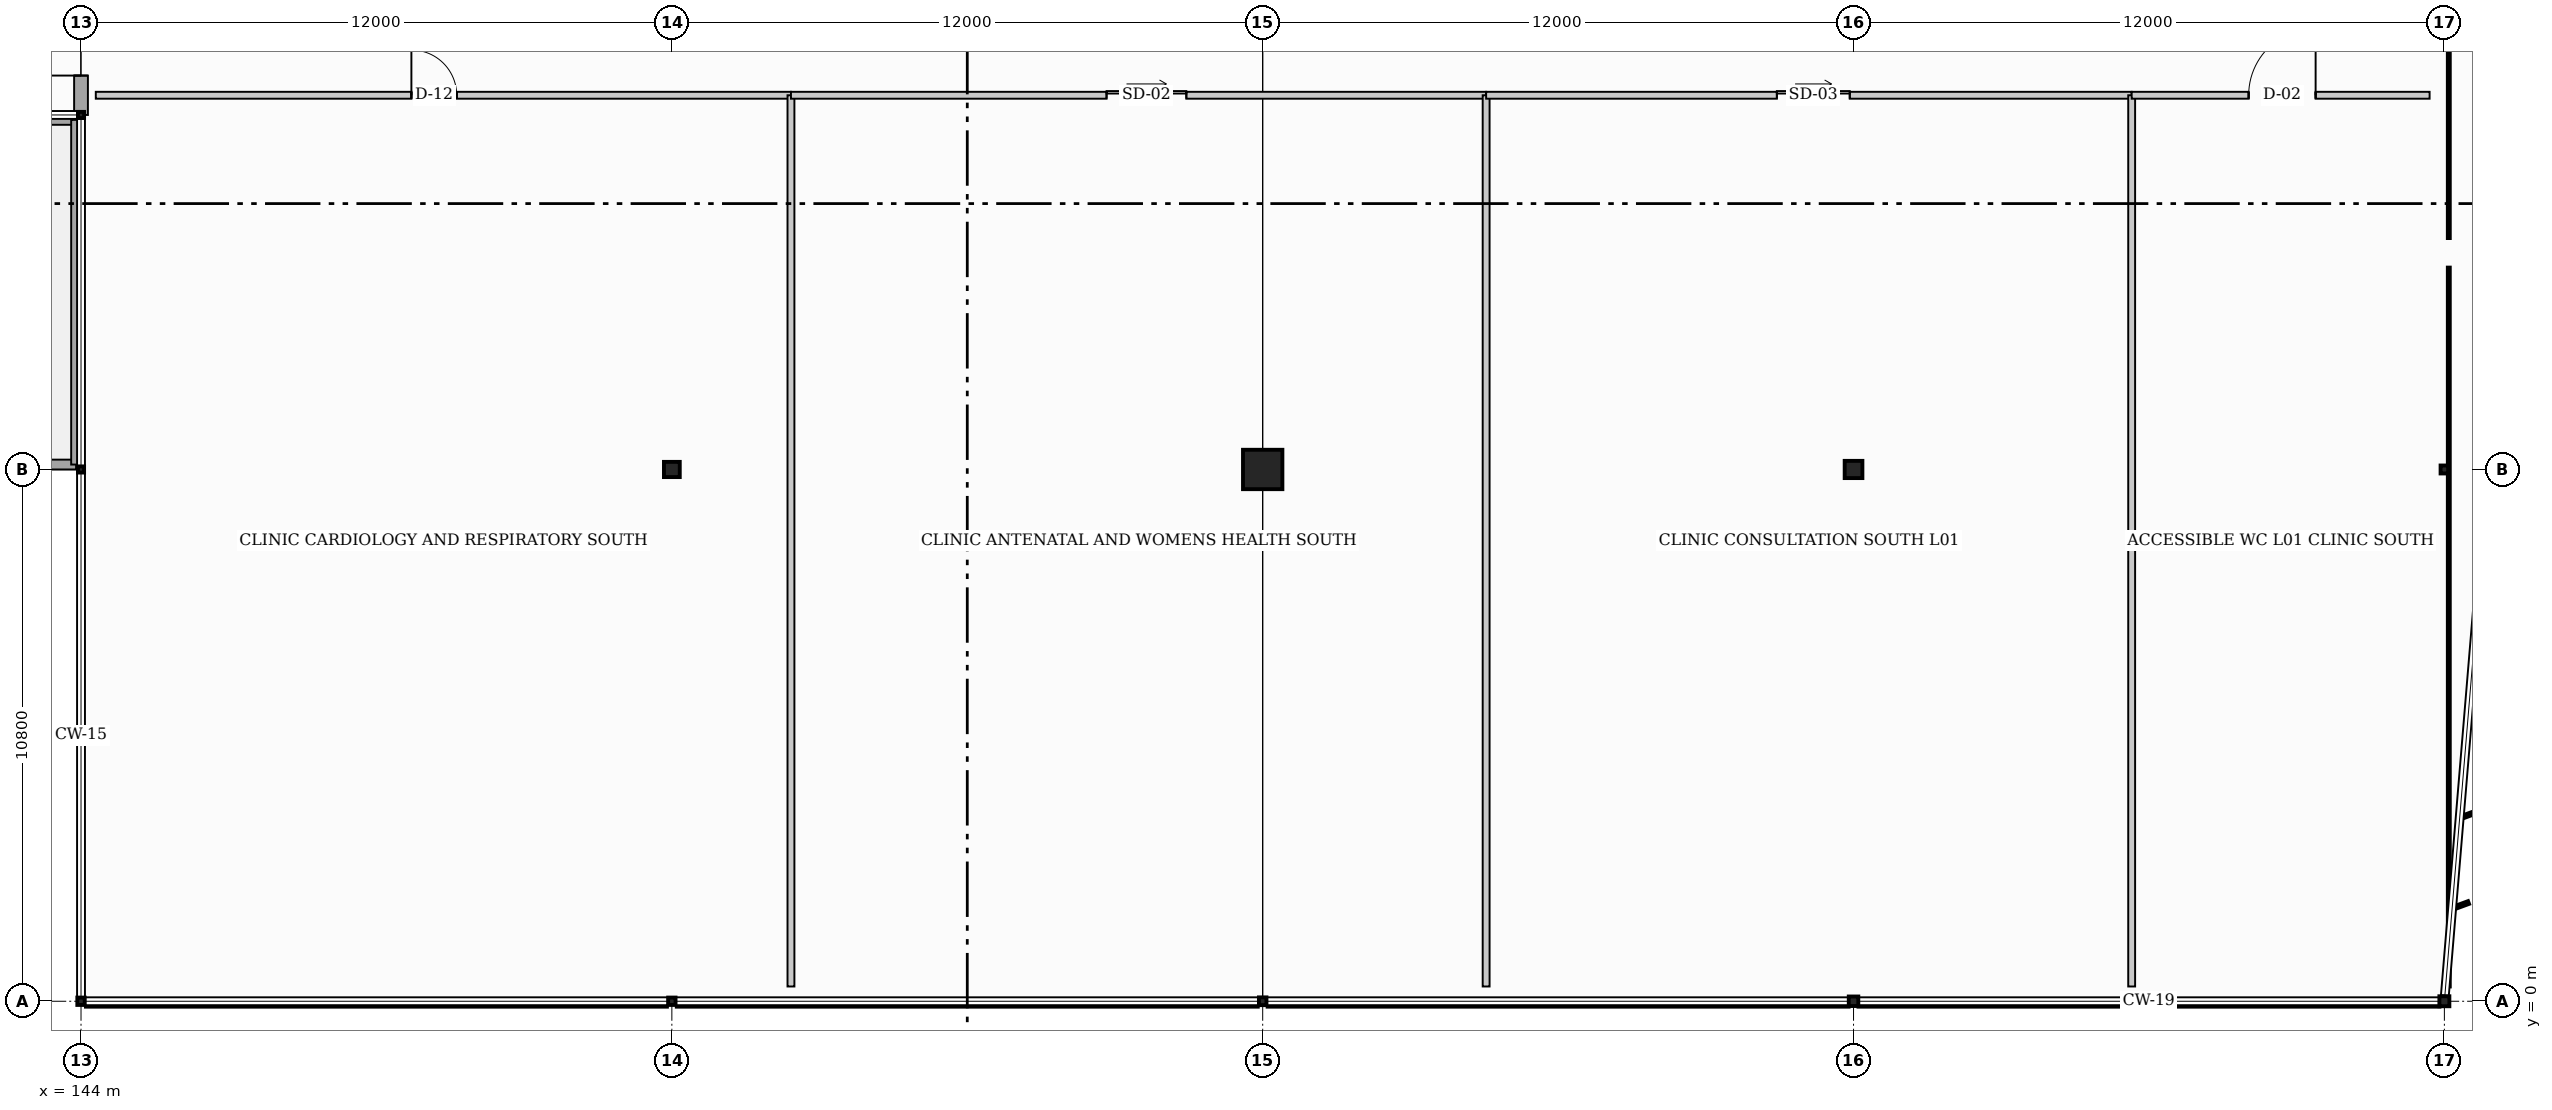
"""IFC4 building model, lengths in metres.
Left out: names, types, materials, properties, quantities, classifications, styles, units other than length and angle.
Written with IfcOpenShell. Run it as: python <this file> out.ifc"""

import sys

from ifc_helpers import new_model, si_unit, direction, frame, frame_2d, origin, origin_2d, place, context, subcontext, project, spatial, rectangle, hollow_rectangle, hollow_circle, i_section, extrude, element, fill, save


model = new_model("IFC4")
c1 = context("Model", 3, precision=1e-05, world=origin(), true_north=direction((0.0, 1.0)))
c2 = subcontext(c1, "Body", "Model", "MODEL_VIEW")
j1 = project(units=[si_unit("LENGTHUNIT", "METRE"), si_unit("PLANEANGLEUNIT", "RADIAN")], contexts=[c1])
p1 = place(None, origin())
s1 = spatial("IfcSite", under=j1, at=p1, CompositionType="ELEMENT")
p2 = place(p1, origin())
s2 = spatial("IfcBuilding", under=s1, at=p2, CompositionType="ELEMENT")
p3 = place(p2, frame((0.0, 0.0, 4.8)))
s3 = spatial("IfcBuildingStorey", under=s2, at=p3, CompositionType="ELEMENT", Elevation=4.8)
p4 = place(p3, frame((144.0, 0.0, 0.0), z_axis=(0.0, 0.0, 1.0), x_axis=(1.0, 0.0, 0.0)))
e1 = element("IfcColumn", 1, at=p4, inside=s3, PredefinedType="COLUMN", context=c2, shape_type="SweptSolid", body=[
    extrude(hollow_rectangle(XDim=0.15, YDim=0.15, WallThickness=0.008, at=origin_2d()), origin(), (0.0, 0.0, 1.0), 4.8),
])
p5 = place(p3, frame((144.0, 10.8, 0.0), z_axis=(0.0, 0.0, 1.0), x_axis=(1.0, 0.0, 0.0)))
e2 = element("IfcColumn", 2, at=p5, inside=s3, PredefinedType="COLUMN", context=c2, shape_type="SweptSolid", body=[
    extrude(hollow_rectangle(XDim=0.125, YDim=0.125, WallThickness=0.006, at=origin_2d()), origin(), (0.0, 0.0, 1.0), 4.8),
])
p6 = place(p3, frame((156.0, 0.0, 0.0), z_axis=(0.0, 0.0, 1.0), x_axis=(0.0, 1.0, 0.0)))
e3 = element("IfcColumn", 3, at=p6, inside=s3, PredefinedType="COLUMN", context=c2, shape_type="SweptSolid", body=[
    extrude(hollow_rectangle(XDim=0.15, YDim=0.15, WallThickness=0.008, at=origin_2d()), origin(), (0.0, 0.0, 1.0), 4.8),
])
p7 = place(p3, frame((156.0, 10.8, 0.0), z_axis=(0.0, 0.0, 1.0), x_axis=(0.0, 1.0, 0.0)))
e4 = element("IfcColumn", 4, at=p7, inside=s3, PredefinedType="COLUMN", context=c2, shape_type="SweptSolid", body=[
    extrude(i_section(OverallWidth=0.309, OverallDepth=0.321, WebThickness=0.014, FlangeThickness=0.022, at=origin_2d()), origin(), (0.0, 0.0, 1.0), 4.8),
])
p8 = place(p3, frame((168.0, 0.0, 0.0), z_axis=(0.0, 0.0, 1.0), x_axis=(1.0, 0.0, 0.0)))
e5 = element("IfcColumn", 5, at=p8, inside=s3, PredefinedType="COLUMN", context=c2, shape_type="SweptSolid", body=[
    extrude(i_section(OverallWidth=0.153, OverallDepth=0.158, WebThickness=0.007, FlangeThickness=0.01, at=origin_2d()), origin(), (0.0, 0.0, 1.0), 4.8),
])
p9 = place(p3, frame((168.0, 10.8, 0.0), z_axis=(0.0, 0.0, 1.0), x_axis=(1.0, 0.0, 0.0)))
e6 = element("IfcColumn", 6, at=p9, inside=s3, PredefinedType="COLUMN", context=c2, shape_type="SweptSolid", body=[
    extrude(rectangle(XDim=0.8, YDim=0.8, at=origin_2d()), origin(), (0.0, 0.0, 1.0), 4.8),
])
p10 = place(p3, frame((180.0, 0.0, 0.0), z_axis=(0.0, 0.0, 1.0), x_axis=(0.0, 1.0, 0.0)))
e7 = element("IfcColumn", 7, at=p10, inside=s3, PredefinedType="COLUMN", context=c2, shape_type="SweptSolid", body=[
    extrude(hollow_circle(Radius=0.097, WallThickness=0.008, at=origin_2d()), origin(), (0.0, 0.0, 1.0), 4.8),
])
p11 = place(p3, frame((180.0, 10.8, 0.0), z_axis=(0.0, 0.0, 1.0), x_axis=(0.0, 1.0, 0.0)))
e8 = element("IfcColumn", 8, at=p11, inside=s3, PredefinedType="COLUMN", context=c2, shape_type="SweptSolid", body=[
    extrude(i_section(OverallWidth=0.35, OverallDepth=0.36, WebThickness=0.016, FlangeThickness=0.028, at=origin_2d()), origin(), (0.0, 0.0, 1.0), 4.8),
])
p12 = place(p3, frame((192.0, 0.0, 0.0), z_axis=(0.0, 0.0, 1.0), x_axis=(1.0, 0.0, 0.0)))
e9 = element("IfcColumn", 9, at=p12, inside=s3, PredefinedType="COLUMN", context=c2, shape_type="SweptSolid", body=[
    extrude(i_section(OverallWidth=0.203, OverallDepth=0.203, WebThickness=0.007, FlangeThickness=0.011, at=origin_2d()), origin(), (0.0, 0.0, 1.0), 4.8),
])
p13 = place(p3, frame((192.0, 10.8, 0.0), z_axis=(0.0, 0.0, 1.0), x_axis=(1.0, 0.0, 0.0)))
e10 = element("IfcColumn", 10, at=p13, inside=s3, PredefinedType="COLUMN", context=c2, shape_type="SweptSolid", body=[
    extrude(i_section(OverallWidth=0.154, OverallDepth=0.162, WebThickness=0.008, FlangeThickness=0.011, at=origin_2d()), origin(), (0.0, 0.0, 1.0), 4.8),
])
p14 = place(p3, frame((144.0, 18.0, 0.0), z_axis=(0.0, 0.0, 1.0), x_axis=(1.0, 0.0, 0.0)))
e11 = element("IfcColumn", 11, at=p14, inside=s3, PredefinedType="COLUMN", context=c2, shape_type="SweptSolid", body=[
    extrude(hollow_rectangle(XDim=0.125, YDim=0.125, WallThickness=0.006, at=origin_2d()), origin(), (0.0, 0.0, 1.0), 4.8),
])
p15 = place(p3, frame((144.0, 18.0, 0.0), z_axis=(0.0, 0.0, 1.0), x_axis=(0.0, 1.0, 0.0)))
e12 = element("IfcWall", 12, at=p15, inside=s3, PredefinedType="STANDARD", context=c2, shape_type="SweptSolid", body=[
    extrude(rectangle(XDim=9.6, YDim=0.28, at=frame_2d((4.8, 0.0))), origin(), (0.0, 0.0, 1.0), 3.53),
])
p16 = place(p15, frame((0.8, 0.0, 0.0)))
e13 = element("IfcOpeningElement", 13, at=p16, cuts=e12, PredefinedType="OPENING", context=c2, shape_type="SweptSolid", body=[
    extrude(rectangle(XDim=2.1, YDim=2.25, at=frame_2d((1.05, 1.125))), frame((0.0, 0.15, 0.0), z_axis=(0.0, -1.0, 0.0), x_axis=(1.0, 0.0, 0.0)), (0.0, 0.0, 1.0), 0.3),
])
for number, where, z_axis, x_axis in (
    (14, (143.9, 10.9, 0.31), (0.0, 0.0, 1.0), (-1.0, 0.0, 0.0)),
    (15, (132.1, 17.9, 0.31), (0.0, 0.0, 1.0), (1.0, 0.0, 0.0)),
):
    element("IfcWall", number, at=place(p3, frame(where, z_axis=z_axis, x_axis=x_axis)), inside=s3, PredefinedType="PARAPET", context=c2, shape_type="SweptSolid", body=[
        extrude(rectangle(XDim=11.8, YDim=0.2, at=frame_2d((5.9, 0.0))), origin(), (0.0, 0.0, 1.0), 1.12),
    ])
p17 = place(p3, frame((143.9, 17.9, 0.31), z_axis=(0.0, 0.0, 1.0), x_axis=(0.0, -1.0, 0.0)))
e16 = element("IfcWall", 16, at=p17, inside=s3, PredefinedType="PARAPET", context=c2, shape_type="SweptSolid", body=[
    extrude(rectangle(XDim=7.0, YDim=0.2, at=frame_2d((3.5, 0.0))), origin(), (0.0, 0.0, 1.0), 1.12),
])
p18 = place(p3, frame((144.3, 18.4, 0.0), z_axis=(0.0, 0.0, 1.0), x_axis=(1.0, 0.0, 0.0)))
e17 = element("IfcWall", 17, at=p18, inside=s3, PredefinedType="PARTITIONING", context=c2, shape_type="SweptSolid", body=[
    extrude(rectangle(XDim=14.119, YDim=0.14, at=frame_2d((7.06, 0.0))), origin(), (0.0, 0.0, 1.0), 3.818),
])
p19 = place(p18, frame((6.41, 0.0, 0.0)))
e18 = element("IfcOpeningElement", 18, at=p19, cuts=e17, PredefinedType="OPENING", context=c2, shape_type="SweptSolid", body=[
    extrude(rectangle(XDim=0.92, YDim=2.04, at=frame_2d((0.46, 1.02))), frame((0.0, 0.08, 0.0), z_axis=(0.0, -1.0, 0.0), x_axis=(1.0, 0.0, 0.0)), (0.0, 0.0, 1.0), 0.16),
])
p20 = place(p3, frame((158.419, 0.3, 0.0), z_axis=(0.0, 0.0, 1.0), x_axis=(0.0, 1.0, 0.0)))
e19 = element("IfcWall", 19, at=p20, inside=s3, PredefinedType="PARTITIONING", context=c2, shape_type="SweptSolid", body=[
    extrude(rectangle(XDim=18.1, YDim=0.14, at=frame_2d((9.05, 0.0))), origin(), (0.0, 0.0, 1.0), 3.53),
])
p21 = place(p3, frame((158.419, 18.4, 0.0), z_axis=(0.0, 0.0, 1.0), x_axis=(1.0, 0.0, 0.0)))
e20 = element("IfcWall", 20, at=p21, inside=s3, PredefinedType="PARTITIONING", context=c2, shape_type="SweptSolid", body=[
    extrude(rectangle(XDim=14.119, YDim=0.14, at=frame_2d((7.06, 0.0))), origin(), (0.0, 0.0, 1.0), 3.828),
])
p22 = place(p21, frame((6.41, 0.0, 0.0)))
e21 = element("IfcOpeningElement", 21, at=p22, cuts=e20, PredefinedType="OPENING", context=c2, shape_type="SweptSolid", body=[
    extrude(rectangle(XDim=1.62, YDim=2.3, at=frame_2d((0.81, 1.15))), frame((0.0, 0.08, 0.0), z_axis=(0.0, -1.0, 0.0), x_axis=(1.0, 0.0, 0.0)), (0.0, 0.0, 1.0), 0.16),
])
p23 = place(p3, frame((172.538, 0.3, 0.0), z_axis=(0.0, 0.0, 1.0), x_axis=(0.0, 1.0, 0.0)))
e22 = element("IfcWall", 22, at=p23, inside=s3, PredefinedType="PARTITIONING", context=c2, shape_type="SweptSolid", body=[
    extrude(rectangle(XDim=18.1, YDim=0.14, at=frame_2d((9.05, 0.0))), origin(), (0.0, 0.0, 1.0), 3.738),
])
p24 = place(p3, frame((172.538, 18.4, 0.0), z_axis=(0.0, 0.0, 1.0), x_axis=(1.0, 0.0, 0.0)))
e23 = element("IfcWall", 23, at=p24, inside=s3, PredefinedType="PARTITIONING", context=c2, shape_type="SweptSolid", body=[
    extrude(rectangle(XDim=13.111, YDim=0.14, at=frame_2d((6.555, 0.0))), origin(), (0.0, 0.0, 1.0), 3.897),
])
p25 = place(p24, frame((5.905, 0.0, 0.0)))
e24 = element("IfcOpeningElement", 24, at=p25, cuts=e23, PredefinedType="OPENING", context=c2, shape_type="SweptSolid", body=[
    extrude(rectangle(XDim=1.48, YDim=2.26, at=frame_2d((0.74, 1.13))), frame((0.0, 0.08, 0.0), z_axis=(0.0, -1.0, 0.0), x_axis=(1.0, 0.0, 0.0)), (0.0, 0.0, 1.0), 0.16),
])
p26 = place(p3, frame((185.649, 0.3, 0.0), z_axis=(0.0, 0.0, 1.0), x_axis=(0.0, 1.0, 0.0)))
e25 = element("IfcWall", 25, at=p26, inside=s3, PredefinedType="PARTITIONING", context=c2, shape_type="SweptSolid", body=[
    extrude(rectangle(XDim=18.1, YDim=0.14, at=frame_2d((9.05, 0.0))), origin(), (0.0, 0.0, 1.0), 3.818),
])
p27 = place(p3, frame((185.649, 18.4, 0.0), z_axis=(0.0, 0.0, 1.0), x_axis=(1.0, 0.0, 0.0)))
e26 = element("IfcWall", 26, at=p27, inside=s3, PredefinedType="PARTITIONING", context=c2, shape_type="SweptSolid", body=[
    extrude(rectangle(XDim=6.051, YDim=0.14, at=frame_2d((3.025, 0.0))), origin(), (0.0, 0.0, 1.0), 4.027),
])
p28 = place(p27, frame((2.376, 0.0, 0.0)))
e27 = element("IfcOpeningElement", 27, at=p28, cuts=e26, PredefinedType="OPENING", context=c2, shape_type="SweptSolid", body=[
    extrude(rectangle(XDim=1.36, YDim=2.18, at=frame_2d((0.68, 1.09))), frame((0.0, 0.08, 0.0), z_axis=(0.0, -1.0, 0.0), x_axis=(1.0, 0.0, 0.0)), (0.0, 0.0, 1.0), 0.16),
])
p29 = place(p16, origin())
e28 = element("IfcDoor", 28, at=p29, inside=s3, OperationType="DOUBLE_DOOR_SINGLE_SWING", PredefinedType="DOOR", context=c2, shape_type="SweptSolid", body=[
    extrude(rectangle(XDim=2.1, YDim=2.25, at=frame_2d((1.05, 1.125))), frame((0.0, 0.025, 0.0), z_axis=(0.0, -1.0, 0.0), x_axis=(1.0, 0.0, 0.0)), (0.0, 0.0, 1.0), 0.05),
])
fill(e13, e28)
p30 = place(p19, origin())
e29 = element("IfcDoor", 29, at=p30, inside=s3, OperationType="SINGLE_SWING_LEFT", PredefinedType="DOOR", context=c2, shape_type="SweptSolid", body=[
    extrude(rectangle(XDim=0.92, YDim=2.04, at=frame_2d((0.46, 1.02))), frame((0.0, 0.025, 0.0), z_axis=(0.0, -1.0, 0.0), x_axis=(1.0, 0.0, 0.0)), (0.0, 0.0, 1.0), 0.05),
])
fill(e18, e29)
p31 = place(p22, origin())
e30 = element("IfcDoor", 30, at=p31, inside=s3, OperationType="SLIDING_TO_RIGHT", PredefinedType="DOOR", context=c2, shape_type="SweptSolid", body=[
    extrude(rectangle(XDim=1.62, YDim=2.3, at=frame_2d((0.81, 1.15))), frame((0.0, 0.025, 0.0), z_axis=(0.0, -1.0, 0.0), x_axis=(1.0, 0.0, 0.0)), (0.0, 0.0, 1.0), 0.05),
])
fill(e21, e30)
p32 = place(p25, origin())
e31 = element("IfcDoor", 31, at=p32, inside=s3, OperationType="SLIDING_TO_LEFT", PredefinedType="DOOR", context=c2, shape_type="SweptSolid", body=[
    extrude(rectangle(XDim=1.48, YDim=2.26, at=frame_2d((0.74, 1.13))), frame((0.0, 0.025, 0.0), z_axis=(0.0, -1.0, 0.0), x_axis=(1.0, 0.0, 0.0)), (0.0, 0.0, 1.0), 0.05),
])
fill(e24, e31)
p33 = place(p28, origin())
e32 = element("IfcDoor", 32, at=p33, inside=s3, OperationType="SINGLE_SWING_RIGHT", PredefinedType="DOOR", context=c2, shape_type="SweptSolid", body=[
    extrude(rectangle(XDim=1.36, YDim=2.18, at=frame_2d((0.68, 1.09))), frame((0.0, 0.025, 0.0), z_axis=(0.0, -1.0, 0.0), x_axis=(1.0, 0.0, 0.0)), (0.0, 0.0, 1.0), 0.05),
])
fill(e27, e32)
save(model, sys.argv[1])
